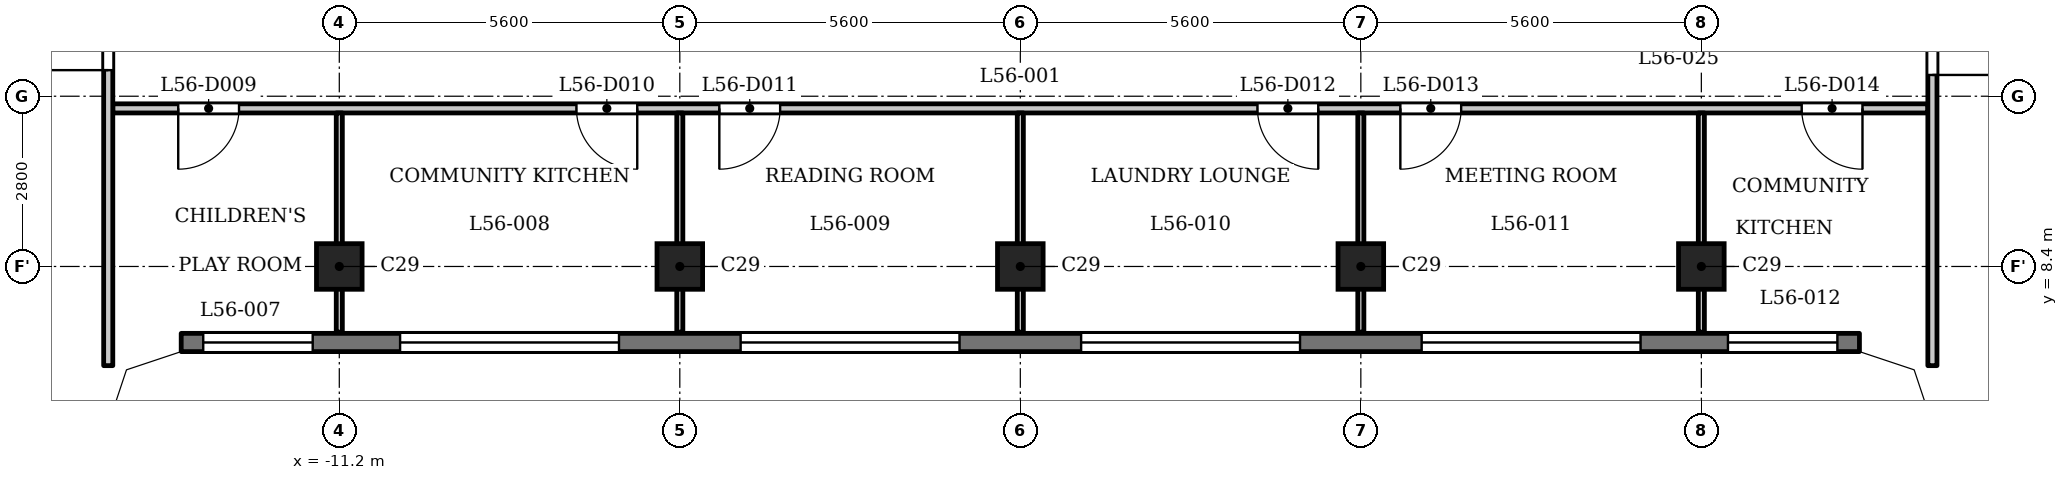
"""IFC4 building model, lengths in metres.
Left out: names, types, materials, properties, quantities, classifications, styles, units other than length and angle.
Written with IfcOpenShell. Run it as: python <this file> out.ifc"""

import sys

from ifc_helpers import new_model, si_unit, direction, frame, frame_2d, origin, origin_2d, place, context, subcontext, project, spatial, polyline, rectangle, outline, extrude, element, fill, save


model = new_model("IFC4")
c1 = context("Model", 3, precision=1e-05, world=origin(), true_north=direction((0.0, 1.0)))
c2 = subcontext(c1, "Body", "Model", "MODEL_VIEW")
j1 = project(units=[si_unit("LENGTHUNIT", "METRE"), si_unit("PLANEANGLEUNIT", "RADIAN")], contexts=[c1])
p1 = place(None, origin())
s1 = spatial("IfcSite", under=j1, at=p1, CompositionType="ELEMENT")
p2 = place(p1, origin())
s2 = spatial("IfcBuilding", under=s1, at=p2, CompositionType="ELEMENT")
p3 = place(p2, frame((0.0, 0.0, 216.9)))
s3 = spatial("IfcBuildingStorey", under=s2, at=p3, CompositionType="ELEMENT", Elevation=216.9)
for number, where, z_axis, x_axis in (
    (1, (-11.2, 8.4, 0.0), (0.0, 0.0, 1.0), (1.0, 0.0, 0.0)),
    (2, (-5.6, 8.4, 0.0), (0.0, 0.0, 1.0), (1.0, 0.0, 0.0)),
    (3, (0.0, 8.4, 0.0), (0.0, 0.0, 1.0), (1.0, 0.0, 0.0)),
    (4, (5.6, 8.4, 0.0), (0.0, 0.0, 1.0), (1.0, 0.0, 0.0)),
    (5, (11.2, 8.4, 0.0), (0.0, 0.0, 1.0), (1.0, 0.0, 0.0)),
):
    element("IfcColumn", number, at=place(p3, frame(where, z_axis=z_axis, x_axis=x_axis)), inside=s3, PredefinedType="COLUMN", context=c2, shape_type="SweptSolid", body=[
        extrude(rectangle(XDim=0.75, YDim=0.75, at=origin_2d()), origin(), (0.0, 0.0, 1.0), 3.5),
    ])
p4 = place(p3, frame((-13.8, 7.15, 0.0), z_axis=(0.0, 0.0, 1.0), x_axis=(1.0, 0.0, 0.0)))
e6 = element("IfcWall", 6, at=p4, inside=s3, PredefinedType="SOLIDWALL", context=c2, shape_type="SweptSolid", body=[
    extrude(rectangle(XDim=27.6, YDim=0.3, at=frame_2d((13.8, 0.0))), origin(), (0.0, 0.0, 1.0), 3.2),
])
p5 = place(p4, frame((0.363, 0.0, 0.9)))
e7 = element("IfcOpeningElement", 7, at=p5, cuts=e6, PredefinedType="OPENING", context=c2, shape_type="SweptSolid", body=[
    extrude(rectangle(XDim=1.8, YDim=1.25, at=frame_2d((0.9, 0.625))), frame((0.0, 0.16, 0.0), z_axis=(0.0, -1.0, 0.0), x_axis=(1.0, 0.0, 0.0)), (0.0, 0.0, 1.0), 0.32),
])
p6 = place(p4, frame((3.6, 0.0, 1.2)))
e8 = element("IfcOpeningElement", 8, at=p6, cuts=e6, PredefinedType="OPENING", context=c2, shape_type="SweptSolid", body=[
    extrude(rectangle(XDim=3.6, YDim=0.95, at=frame_2d((1.8, 0.475))), frame((0.0, 0.16, 0.0), z_axis=(0.0, -1.0, 0.0), x_axis=(1.0, 0.0, 0.0)), (0.0, 0.0, 1.0), 0.32),
])
p7 = place(p4, frame((9.2, 0.0, 1.2)))
e9 = element("IfcOpeningElement", 9, at=p7, cuts=e6, PredefinedType="OPENING", context=c2, shape_type="SweptSolid", body=[
    extrude(rectangle(XDim=3.6, YDim=0.95, at=frame_2d((1.8, 0.475))), frame((0.0, 0.16, 0.0), z_axis=(0.0, -1.0, 0.0), x_axis=(1.0, 0.0, 0.0)), (0.0, 0.0, 1.0), 0.32),
])
p8 = place(p4, frame((14.8, 0.0, 1.2)))
e10 = element("IfcOpeningElement", 10, at=p8, cuts=e6, PredefinedType="OPENING", context=c2, shape_type="SweptSolid", body=[
    extrude(rectangle(XDim=3.6, YDim=0.95, at=frame_2d((1.8, 0.475))), frame((0.0, 0.16, 0.0), z_axis=(0.0, -1.0, 0.0), x_axis=(1.0, 0.0, 0.0)), (0.0, 0.0, 1.0), 0.32),
])
p9 = place(p4, frame((20.4, 0.0, 1.2)))
e11 = element("IfcOpeningElement", 11, at=p9, cuts=e6, PredefinedType="OPENING", context=c2, shape_type="SweptSolid", body=[
    extrude(rectangle(XDim=3.6, YDim=0.95, at=frame_2d((1.8, 0.475))), frame((0.0, 0.16, 0.0), z_axis=(0.0, -1.0, 0.0), x_axis=(1.0, 0.0, 0.0)), (0.0, 0.0, 1.0), 0.32),
])
p10 = place(p4, frame((25.438, 0.0, 0.9)))
e12 = element("IfcOpeningElement", 12, at=p10, cuts=e6, PredefinedType="OPENING", context=c2, shape_type="SweptSolid", body=[
    extrude(rectangle(XDim=1.8, YDim=1.25, at=frame_2d((0.9, 0.625))), frame((0.0, 0.16, 0.0), z_axis=(0.0, -1.0, 0.0), x_axis=(1.0, 0.0, 0.0)), (0.0, 0.0, 1.0), 0.32),
])
p11 = place(p3, frame((-14.925, 11.0, 0.0), z_axis=(0.0, 0.0, 1.0), x_axis=(1.0, 0.0, 0.0)))
e13 = element("IfcWall", 13, at=p11, inside=s3, PredefinedType="PARTITIONING", context=c2, shape_type="SweptSolid", body=[
    extrude(rectangle(XDim=29.85, YDim=0.15, at=frame_2d((14.925, 0.0))), origin(), (0.0, 0.0, 1.0), 3.2),
])
p12 = place(p11, frame((1.076, 0.0, 0.0)))
e14 = element("IfcOpeningElement", 14, at=p12, cuts=e13, PredefinedType="OPENING", context=c2, shape_type="SweptSolid", body=[
    extrude(rectangle(XDim=1.0, YDim=2.1, at=frame_2d((0.5, 1.05))), frame((0.0, 0.085, 0.0), z_axis=(0.0, -1.0, 0.0), x_axis=(1.0, 0.0, 0.0)), (0.0, 0.0, 1.0), 0.17),
])
p13 = place(p11, frame((7.625, 0.0, 0.0)))
e15 = element("IfcOpeningElement", 15, at=p13, cuts=e13, PredefinedType="OPENING", context=c2, shape_type="SweptSolid", body=[
    extrude(rectangle(XDim=1.0, YDim=2.1, at=frame_2d((0.5, 1.05))), frame((0.0, 0.085, 0.0), z_axis=(0.0, -1.0, 0.0), x_axis=(1.0, 0.0, 0.0)), (0.0, 0.0, 1.0), 0.17),
])
p14 = place(p11, frame((9.975, 0.0, 0.0)))
e16 = element("IfcOpeningElement", 16, at=p14, cuts=e13, PredefinedType="OPENING", context=c2, shape_type="SweptSolid", body=[
    extrude(rectangle(XDim=1.0, YDim=2.1, at=frame_2d((0.5, 1.05))), frame((0.0, 0.085, 0.0), z_axis=(0.0, -1.0, 0.0), x_axis=(1.0, 0.0, 0.0)), (0.0, 0.0, 1.0), 0.17),
])
p15 = place(p11, frame((18.825, 0.0, 0.0)))
e17 = element("IfcOpeningElement", 17, at=p15, cuts=e13, PredefinedType="OPENING", context=c2, shape_type="SweptSolid", body=[
    extrude(rectangle(XDim=1.0, YDim=2.1, at=frame_2d((0.5, 1.05))), frame((0.0, 0.085, 0.0), z_axis=(0.0, -1.0, 0.0), x_axis=(1.0, 0.0, 0.0)), (0.0, 0.0, 1.0), 0.17),
])
p16 = place(p11, frame((21.175, 0.0, 0.0)))
e18 = element("IfcOpeningElement", 18, at=p16, cuts=e13, PredefinedType="OPENING", context=c2, shape_type="SweptSolid", body=[
    extrude(rectangle(XDim=1.0, YDim=2.1, at=frame_2d((0.5, 1.05))), frame((0.0, 0.085, 0.0), z_axis=(0.0, -1.0, 0.0), x_axis=(1.0, 0.0, 0.0)), (0.0, 0.0, 1.0), 0.17),
])
p17 = place(p11, frame((27.775, 0.0, 0.0)))
e19 = element("IfcOpeningElement", 19, at=p17, cuts=e13, PredefinedType="OPENING", context=c2, shape_type="SweptSolid", body=[
    extrude(rectangle(XDim=1.0, YDim=2.1, at=frame_2d((0.5, 1.05))), frame((0.0, 0.085, 0.0), z_axis=(0.0, -1.0, 0.0), x_axis=(1.0, 0.0, 0.0)), (0.0, 0.0, 1.0), 0.17),
])
p18 = place(p3, frame((-15.0, 6.769, 0.0), z_axis=(0.0, 0.0, 1.0), x_axis=(0.0, 1.0, 0.0)))
e20 = element("IfcWall", 20, at=p18, inside=s3, PredefinedType="PARTITIONING", context=c2, shape_type="SweptSolid", body=[
    extrude(rectangle(XDim=6.356, YDim=0.15, at=frame_2d((3.178, 0.0))), origin(), (0.0, 0.0, 1.0), 3.2),
])
p19 = place(p18, frame((4.86, 0.0, 0.0)))
e21 = element("IfcOpeningElement", 21, at=p19, cuts=e20, PredefinedType="OPENING", context=c2, shape_type="SweptSolid", body=[
    extrude(rectangle(XDim=1.0, YDim=2.1, at=frame_2d((0.5, 1.05))), frame((0.0, 0.085, 0.0), z_axis=(0.0, -1.0, 0.0), x_axis=(1.0, 0.0, 0.0)), (0.0, 0.0, 1.0), 0.17),
])
for number, where, z_axis, x_axis in (
    (22, (-11.2, 7.32, 0.0), (0.0, 0.0, 1.0), (0.0, 1.0, 0.0)),
    (23, (-5.6, 7.32, 0.0), (0.0, 0.0, 1.0), (0.0, 1.0, 0.0)),
    (24, (0.0, 7.32, 0.0), (0.0, 0.0, 1.0), (0.0, 1.0, 0.0)),
    (25, (5.6, 7.32, 0.0), (0.0, 0.0, 1.0), (0.0, 1.0, 0.0)),
    (26, (11.2, 7.32, 0.0), (0.0, 0.0, 1.0), (0.0, 1.0, 0.0)),
):
    element("IfcWall", number, at=place(p3, frame(where, z_axis=z_axis, x_axis=x_axis)), inside=s3, PredefinedType="PARTITIONING", context=c2, shape_type="SweptSolid", body=[
        extrude(rectangle(XDim=3.605, YDim=0.1, at=frame_2d((1.802, 0.0))), origin(), (0.0, 0.0, 1.0), 3.2),
    ])
p20 = place(p3, frame((15.0, 6.769, 0.0), z_axis=(0.0, 0.0, 1.0), x_axis=(0.0, 1.0, 0.0)))
e27 = element("IfcWall", 27, at=p20, inside=s3, PredefinedType="PARTITIONING", context=c2, shape_type="SweptSolid", body=[
    extrude(rectangle(XDim=6.356, YDim=0.15, at=frame_2d((3.178, 0.0))), origin(), (0.0, 0.0, 1.0), 3.2),
])
p21 = place(p20, frame((4.781, 0.0, 0.0)))
e28 = element("IfcOpeningElement", 28, at=p21, cuts=e27, PredefinedType="OPENING", context=c2, shape_type="SweptSolid", body=[
    extrude(rectangle(XDim=1.0, YDim=2.1, at=frame_2d((0.5, 1.05))), frame((0.0, 0.085, 0.0), z_axis=(0.0, -1.0, 0.0), x_axis=(1.0, 0.0, 0.0)), (0.0, 0.0, 1.0), 0.17),
])
p22 = place(p3, origin())
e29 = element("IfcWall", 29, at=p22, inside=s3, PredefinedType="SOLIDWALL", context=c2, shape_type="SweptSolid", body=[
    extrude(outline(polyline([(-13.849, 7.3), (-14.937, 6.937), (-15.3, 5.849), (-15.3, 5.8), (-15.0, 5.8), (-14.7, 6.7), (-13.8, 7.0), (-13.8, 7.3), (-13.849, 7.3)])), origin(), (0.0, 0.0, 1.0), 3.2),
])
e30 = element("IfcWall", 30, at=p22, inside=s3, PredefinedType="SOLIDWALL", context=c2, shape_type="SweptSolid", body=[
    extrude(outline(polyline([(14.937, 6.937), (13.849, 7.3), (13.8, 7.3), (13.8, 7.0), (14.7, 6.7), (15.0, 5.8), (15.3, 5.8), (15.3, 5.849), (14.937, 6.937)])), origin(), (0.0, 0.0, 1.0), 3.2),
])
p23 = place(p19, origin())
e31 = element("IfcDoor", 31, at=p23, inside=s3, OperationType="SINGLE_SWING_RIGHT", PredefinedType="DOOR", context=c2, shape_type="SweptSolid", body=[
    extrude(rectangle(XDim=1.0, YDim=2.1, at=frame_2d((0.5, 1.05))), frame((0.0, 0.025, 0.0), z_axis=(0.0, -1.0, 0.0), x_axis=(1.0, 0.0, 0.0)), (0.0, 0.0, 1.0), 0.05),
])
fill(e21, e31)
p24 = place(p21, origin())
e32 = element("IfcDoor", 32, at=p24, inside=s3, OperationType="SINGLE_SWING_LEFT", PredefinedType="DOOR", context=c2, shape_type="SweptSolid", body=[
    extrude(rectangle(XDim=1.0, YDim=2.1, at=frame_2d((0.5, 1.05))), frame((0.0, 0.025, 0.0), z_axis=(0.0, -1.0, 0.0), x_axis=(1.0, 0.0, 0.0)), (0.0, 0.0, 1.0), 0.05),
])
fill(e28, e32)
p25 = place(p12, origin())
e33 = element("IfcDoor", 33, at=p25, inside=s3, OperationType="SINGLE_SWING_LEFT", PredefinedType="DOOR", context=c2, shape_type="SweptSolid", body=[
    extrude(rectangle(XDim=1.0, YDim=2.1, at=frame_2d((0.5, 1.05))), frame((0.0, 0.025, 0.0), z_axis=(0.0, -1.0, 0.0), x_axis=(1.0, 0.0, 0.0)), (0.0, 0.0, 1.0), 0.05),
])
fill(e14, e33)
p26 = place(p13, origin())
e34 = element("IfcDoor", 34, at=p26, inside=s3, OperationType="SINGLE_SWING_RIGHT", PredefinedType="DOOR", context=c2, shape_type="SweptSolid", body=[
    extrude(rectangle(XDim=1.0, YDim=2.1, at=frame_2d((0.5, 1.05))), frame((0.0, 0.025, 0.0), z_axis=(0.0, -1.0, 0.0), x_axis=(1.0, 0.0, 0.0)), (0.0, 0.0, 1.0), 0.05),
])
fill(e15, e34)
p27 = place(p14, origin())
e35 = element("IfcDoor", 35, at=p27, inside=s3, OperationType="SINGLE_SWING_LEFT", PredefinedType="DOOR", context=c2, shape_type="SweptSolid", body=[
    extrude(rectangle(XDim=1.0, YDim=2.1, at=frame_2d((0.5, 1.05))), frame((0.0, 0.025, 0.0), z_axis=(0.0, -1.0, 0.0), x_axis=(1.0, 0.0, 0.0)), (0.0, 0.0, 1.0), 0.05),
])
fill(e16, e35)
p28 = place(p15, origin())
e36 = element("IfcDoor", 36, at=p28, inside=s3, OperationType="SINGLE_SWING_RIGHT", PredefinedType="DOOR", context=c2, shape_type="SweptSolid", body=[
    extrude(rectangle(XDim=1.0, YDim=2.1, at=frame_2d((0.5, 1.05))), frame((0.0, 0.025, 0.0), z_axis=(0.0, -1.0, 0.0), x_axis=(1.0, 0.0, 0.0)), (0.0, 0.0, 1.0), 0.05),
])
fill(e17, e36)
p29 = place(p16, origin())
e37 = element("IfcDoor", 37, at=p29, inside=s3, OperationType="SINGLE_SWING_LEFT", PredefinedType="DOOR", context=c2, shape_type="SweptSolid", body=[
    extrude(rectangle(XDim=1.0, YDim=2.1, at=frame_2d((0.5, 1.05))), frame((0.0, 0.025, 0.0), z_axis=(0.0, -1.0, 0.0), x_axis=(1.0, 0.0, 0.0)), (0.0, 0.0, 1.0), 0.05),
])
fill(e18, e37)
p30 = place(p17, origin())
e38 = element("IfcDoor", 38, at=p30, inside=s3, OperationType="SINGLE_SWING_RIGHT", PredefinedType="DOOR", context=c2, shape_type="SweptSolid", body=[
    extrude(rectangle(XDim=1.0, YDim=2.1, at=frame_2d((0.5, 1.05))), frame((0.0, 0.025, 0.0), z_axis=(0.0, -1.0, 0.0), x_axis=(1.0, 0.0, 0.0)), (0.0, 0.0, 1.0), 0.05),
])
fill(e19, e38)
p31 = place(p5, origin())
e39 = element("IfcWindow", 39, at=p31, inside=s3, PartitioningType="SINGLE_PANEL", PredefinedType="WINDOW", context=c2, shape_type="SweptSolid", body=[
    extrude(rectangle(XDim=1.8, YDim=1.25, at=frame_2d((0.9, 0.625))), frame((0.0, 0.03, 0.0), z_axis=(0.0, -1.0, 0.0), x_axis=(1.0, 0.0, 0.0)), (0.0, 0.0, 1.0), 0.06),
])
fill(e7, e39)
p32 = place(p6, origin())
e40 = element("IfcWindow", 40, at=p32, inside=s3, PartitioningType="SINGLE_PANEL", PredefinedType="WINDOW", context=c2, shape_type="SweptSolid", body=[
    extrude(rectangle(XDim=3.6, YDim=0.95, at=frame_2d((1.8, 0.475))), frame((0.0, 0.03, 0.0), z_axis=(0.0, -1.0, 0.0), x_axis=(1.0, 0.0, 0.0)), (0.0, 0.0, 1.0), 0.06),
])
fill(e8, e40)
p33 = place(p7, origin())
e41 = element("IfcWindow", 41, at=p33, inside=s3, PartitioningType="SINGLE_PANEL", PredefinedType="WINDOW", context=c2, shape_type="SweptSolid", body=[
    extrude(rectangle(XDim=3.6, YDim=0.95, at=frame_2d((1.8, 0.475))), frame((0.0, 0.03, 0.0), z_axis=(0.0, -1.0, 0.0), x_axis=(1.0, 0.0, 0.0)), (0.0, 0.0, 1.0), 0.06),
])
fill(e9, e41)
p34 = place(p8, origin())
e42 = element("IfcWindow", 42, at=p34, inside=s3, PartitioningType="SINGLE_PANEL", PredefinedType="WINDOW", context=c2, shape_type="SweptSolid", body=[
    extrude(rectangle(XDim=3.6, YDim=0.95, at=frame_2d((1.8, 0.475))), frame((0.0, 0.03, 0.0), z_axis=(0.0, -1.0, 0.0), x_axis=(1.0, 0.0, 0.0)), (0.0, 0.0, 1.0), 0.06),
])
fill(e10, e42)
p35 = place(p9, origin())
e43 = element("IfcWindow", 43, at=p35, inside=s3, PartitioningType="SINGLE_PANEL", PredefinedType="WINDOW", context=c2, shape_type="SweptSolid", body=[
    extrude(rectangle(XDim=3.6, YDim=0.95, at=frame_2d((1.8, 0.475))), frame((0.0, 0.03, 0.0), z_axis=(0.0, -1.0, 0.0), x_axis=(1.0, 0.0, 0.0)), (0.0, 0.0, 1.0), 0.06),
])
fill(e11, e43)
p36 = place(p10, origin())
e44 = element("IfcWindow", 44, at=p36, inside=s3, PartitioningType="SINGLE_PANEL", PredefinedType="WINDOW", context=c2, shape_type="SweptSolid", body=[
    extrude(rectangle(XDim=1.8, YDim=1.25, at=frame_2d((0.9, 0.625))), frame((0.0, 0.03, 0.0), z_axis=(0.0, -1.0, 0.0), x_axis=(1.0, 0.0, 0.0)), (0.0, 0.0, 1.0), 0.06),
])
fill(e12, e44)
save(model, sys.argv[1])
